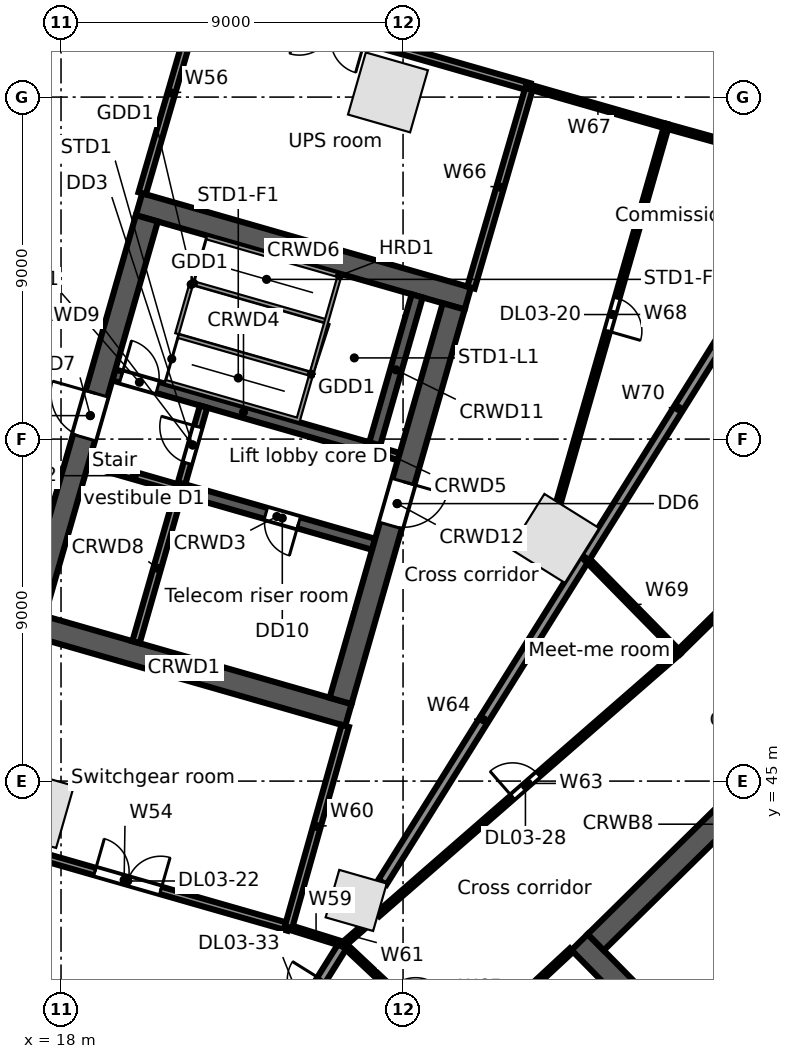
"""IFC4 building model, lengths in metres.
Left out: names, types, materials, properties, quantities, classifications, styles, units other than length and angle.
Written with IfcOpenShell. Run it as: python <this file> out.ifc"""

import sys

from ifc_helpers import new_model, si_unit, direction, frame, frame_2d, origin, origin_2d, place, context, subcontext, project, spatial, rectangle, extrude, element, fill, save


model = new_model("IFC4")
c1 = context("Model", 3, precision=1e-05, world=origin(), true_north=direction((0.0, 1.0)))
c2 = subcontext(c1, "Body", "Model", "MODEL_VIEW")
j1 = project(units=[si_unit("LENGTHUNIT", "METRE"), si_unit("PLANEANGLEUNIT", "RADIAN")], contexts=[c1])
p1 = place(None, origin())
s1 = spatial("IfcSite", under=j1, at=p1, CompositionType="ELEMENT")
p2 = place(p1, origin())
s2 = spatial("IfcBuilding", under=s1, at=p2, CompositionType="ELEMENT")
p3 = place(p2, frame((0.0, 0.0, 21.5)))
s3 = spatial("IfcBuildingStorey", under=s2, at=p3, CompositionType="ELEMENT", Elevation=21.5)
for number, where, z_axis, x_axis in (
    (1, (26.603, 63.124, 0.0), (0.0, 0.0, 1.0), (-0.961, 0.276, 0.0)),
    (2, (17.288, 44.291, 0.0), (0.0, 0.0, 1.0), (0.961, -0.276, 0.0)),
):
    element("IfcColumn", number, at=place(p3, frame(where, z_axis=z_axis, x_axis=x_axis)), inside=s3, PredefinedType="COLUMN", context=c2, shape_type="SweptSolid", body=[
        extrude(rectangle(XDim=1.7, YDim=1.7, at=origin_2d()), origin(), (0.0, 0.0, 1.0), 5.0),
    ])
p4 = place(p3, frame((25.767, 41.86, 0.0), z_axis=(0.0, 0.0, 1.0), x_axis=(0.961261695938, -0.275637355817, 0.0)))
e3 = element("IfcColumn", 3, at=p4, inside=s3, PredefinedType="COLUMN", context=c2, shape_type="SweptSolid", body=[
    extrude(rectangle(XDim=1.3, YDim=1.3, at=origin_2d()), origin(), (0.0, 0.0, 1.0), 5.0),
])
p5 = place(p3, frame((30.99, 51.386, 0.0), z_axis=(0.0, 0.0, 1.0), x_axis=(0.529919264233, 0.848048096156, 0.0)))
e4 = element("IfcColumn", 4, at=p5, inside=s3, PredefinedType="COLUMN", context=c2, shape_type="SweptSolid", body=[
    extrude(rectangle(XDim=1.7, YDim=1.7, at=origin_2d()), origin(), (0.0, 0.0, 1.0), 5.0),
])
p6 = place(p3, frame((31.646, 40.763, 0.0), z_axis=(0.0, 0.0, 1.0), x_axis=(0.700911255944, -0.713248491965, 0.0)))
e5 = element("IfcWall", 5, at=p6, inside=s3, PredefinedType="SOLIDWALL", context=c2, shape_type="SweptSolid", body=[
    extrude(rectangle(XDim=15.0, YDim=0.6, at=frame_2d((7.5, 0.0))), origin(), (0.0, 0.0, 1.0), 4.68),
])
p7 = place(p6, frame((12.9, 0.0, 0.0)))
e6 = element("IfcOpeningElement", 6, at=p7, cuts=e5, PredefinedType="OPENING", context=c2, shape_type="SweptSolid", body=[
    extrude(rectangle(XDim=1.2, YDim=2.1, at=frame_2d((0.6, 1.05))), frame((0.0, 0.31, 0.0), z_axis=(0.0, -1.0, 0.0), x_axis=(1.0, 0.0, 0.0)), (0.0, 0.0, 1.0), 0.62),
])
p8 = place(p3, frame((32.07, 40.759, 0.0), z_axis=(0.0, 0.0, 1.0), x_axis=(0.713245344712, 0.70091445858, 0.0)))
e7 = element("IfcWall", 7, at=p8, inside=s3, PredefinedType="SOLIDWALL", context=c2, shape_type="SweptSolid", body=[
    extrude(rectangle(XDim=13.8, YDim=0.6, at=frame_2d((6.9, 0.0))), origin(), (0.0, 0.0, 1.0), 4.68),
])
p9 = place(p3, frame((34.593, 38.191, 0.0), z_axis=(0.0, 0.0, 1.0), x_axis=(0.713252216116, 0.700907466222, 0.0)))
e8 = element("IfcWall", 8, at=p9, inside=s3, PredefinedType="SOLIDWALL", context=c2, shape_type="SweptSolid", body=[
    extrude(rectangle(XDim=4.45, YDim=0.2, at=frame_2d((2.225, 0.0))), origin(), (0.0, 0.0, 1.0), 4.68),
])
p10 = place(p3, frame((16.911, 49.221, 0.0), z_axis=(0.0, 0.0, 1.0), x_axis=(0.96126248289, -0.275634611374, 0.0)))
e9 = element("IfcWall", 9, at=p10, inside=s3, PredefinedType="SOLIDWALL", context=c2, shape_type="SweptSolid", body=[
    extrude(rectangle(XDim=9.0, YDim=0.6, at=frame_2d((4.5, 0.0))), origin(), (0.0, 0.0, 1.0), 4.68),
])
p11 = place(p3, frame((18.728, 53.382, 0.0), z_axis=(0.0, 0.0, 1.0), x_axis=(0.961247070632, -0.275688355216, 0.0)))
e10 = element("IfcWall", 10, at=p11, inside=s3, PredefinedType="SOLIDWALL", context=c2, shape_type="SweptSolid", body=[
    extrude(rectangle(XDim=2.5, YDim=0.2, at=frame_2d((1.25, 0.0))), origin(), (0.0, 0.0, 1.0), 4.68),
])
p12 = place(p3, frame((21.131, 52.692, 0.0), z_axis=(0.0, 0.0, 1.0), x_axis=(0.961271492568, -0.275603188616, 0.0)))
e11 = element("IfcWall", 11, at=p12, inside=s3, PredefinedType="SOLIDWALL", context=c2, shape_type="SweptSolid", body=[
    extrude(rectangle(XDim=5.3, YDim=0.3, at=frame_2d((2.65, 0.0))), origin(), (0.0, 0.0, 1.0), 4.68),
])
p13 = place(p12, frame((2.35, 0.0, 0.0)))
e12 = element("IfcOpeningElement", 12, at=p13, cuts=e11, PredefinedType="OPENING", context=c2, shape_type="SweptSolid", body=[
    extrude(rectangle(XDim=0.9, YDim=2.1, at=frame_2d((0.45, 1.05))), frame((0.0, 0.16, 0.0), z_axis=(0.0, -1.0, 0.0), x_axis=(1.0, 0.0, 0.0)), (0.0, 0.0, 1.0), 0.32),
])
p14 = place(p3, frame((19.389, 55.689, 0.0), z_axis=(0.0, 0.0, 1.0), x_axis=(0.961261397636, -0.275638396117, 0.0)))
e13 = element("IfcWall", 13, at=p14, inside=s3, PredefinedType="SOLIDWALL", context=c2, shape_type="SweptSolid", body=[
    extrude(rectangle(XDim=7.1, YDim=0.3, at=frame_2d((3.55, 0.0))), origin(), (0.0, 0.0, 1.0), 4.68),
])
p15 = place(p14, frame((0.2, 0.0, 0.0)))
e14 = element("IfcOpeningElement", 14, at=p15, cuts=e13, PredefinedType="OPENING", context=c2, shape_type="SweptSolid", body=[
    extrude(rectangle(XDim=1.0, YDim=2.1, at=frame_2d((0.5, 1.05))), frame((0.0, 0.16, 0.0), z_axis=(0.0, -1.0, 0.0), x_axis=(1.0, 0.0, 0.0)), (0.0, 0.0, 1.0), 0.32),
])
p16 = place(p3, frame((26.214, 53.732, 0.0), z_axis=(0.0, 0.0, 1.0), x_axis=(0.96122076476, -0.27578005982, 0.0)))
e15 = element("IfcWall", 15, at=p16, inside=s3, PredefinedType="SOLIDWALL", context=c2, shape_type="SweptSolid", body=[
    extrude(rectangle(XDim=0.7, YDim=0.2, at=frame_2d((0.35, 0.0))), origin(), (0.0, 0.0, 1.0), 4.68),
])
p17 = place(p3, frame((20.053, 60.18, 0.0), z_axis=(0.0, 0.0, 1.0), x_axis=(0.96126248289, -0.275634611374, 0.0)))
e16 = element("IfcWall", 16, at=p17, inside=s3, PredefinedType="SOLIDWALL", context=c2, shape_type="SweptSolid", body=[
    extrude(rectangle(XDim=9.0, YDim=0.6, at=frame_2d((4.5, 0.0))), origin(), (0.0, 0.0, 1.0), 4.68),
])
p18 = place(p3, frame((17.282, 49.427, 0.0), z_axis=(0.0, 0.0, 1.0), x_axis=(0.275631631629, 0.961263337304, 0.0)))
e17 = element("IfcWall", 17, at=p18, inside=s3, PredefinedType="SOLIDWALL", context=c2, shape_type="SweptSolid", body=[
    extrude(rectangle(XDim=10.8, YDim=0.6, at=frame_2d((5.4, 0.0))), origin(), (0.0, 0.0, 1.0), 4.68),
])
p19 = place(p18, frame((4.8, 0.0, 0.0)))
e18 = element("IfcOpeningElement", 18, at=p19, cuts=e17, PredefinedType="OPENING", context=c2, shape_type="SweptSolid", body=[
    extrude(rectangle(XDim=1.2, YDim=2.1, at=frame_2d((0.6, 1.05))), frame((0.0, 0.31, 0.0), z_axis=(0.0, -1.0, 0.0), x_axis=(1.0, 0.0, 0.0)), (0.0, 0.0, 1.0), 0.62),
])
p20 = place(p3, frame((19.973, 48.655, 0.0), z_axis=(0.0, 0.0, 1.0), x_axis=(0.275668441653, 0.961252781674, 0.0)))
e19 = element("IfcWall", 19, at=p20, inside=s3, PredefinedType="SOLIDWALL", context=c2, shape_type="SweptSolid", body=[
    extrude(rectangle(XDim=4.05, YDim=0.2, at=frame_2d((2.025, 0.0))), origin(), (0.0, 0.0, 1.0), 4.68),
])
p21 = place(p3, frame((21.172, 52.837, 0.0), z_axis=(0.0, 0.0, 1.0), x_axis=(0.275657676022, 0.961255868981, 0.0)))
e20 = element("IfcWall", 20, at=p21, inside=s3, PredefinedType="PARTITIONING", context=c2, shape_type="SweptSolid", body=[
    extrude(rectangle(XDim=2.1, YDim=0.2, at=frame_2d((1.05, 0.0))), origin(), (0.0, 0.0, 1.0), 4.68),
])
p22 = place(p21, frame((0.55, 0.0, 0.0)))
e21 = element("IfcOpeningElement", 21, at=p22, cuts=e20, PredefinedType="OPENING", context=c2, shape_type="SweptSolid", body=[
    extrude(rectangle(XDim=1.0, YDim=2.1, at=frame_2d((0.5, 1.05))), frame((0.0, 0.11, 0.0), z_axis=(0.0, -1.0, 0.0), x_axis=(1.0, 0.0, 0.0)), (0.0, 0.0, 1.0), 0.22),
])
p23 = place(p3, frame((26.256, 53.876, 0.0), z_axis=(0.0, 0.0, 1.0), x_axis=(0.275612739511, 0.961268754209, 0.0)))
e22 = element("IfcWall", 22, at=p23, inside=s3, PredefinedType="SOLIDWALL", context=c2, shape_type="SweptSolid", body=[
    extrude(rectangle(XDim=4.05, YDim=0.3, at=frame_2d((2.025, 0.0))), origin(), (0.0, 0.0, 1.0), 4.68),
])
p24 = place(p3, frame((25.356, 47.112, 0.0), z_axis=(0.0, 0.0, 1.0), x_axis=(0.275631631629, 0.961263337304, 0.0)))
e23 = element("IfcWall", 23, at=p24, inside=s3, PredefinedType="SOLIDWALL", context=c2, shape_type="SweptSolid", body=[
    extrude(rectangle(XDim=10.8, YDim=0.6, at=frame_2d((5.4, 0.0))), origin(), (0.0, 0.0, 1.0), 4.68),
])
p25 = place(p24, frame((4.8, 0.0, 0.0)))
e24 = element("IfcOpeningElement", 24, at=p25, cuts=e23, PredefinedType="OPENING", context=c2, shape_type="SweptSolid", body=[
    extrude(rectangle(XDim=1.2, YDim=2.1, at=frame_2d((0.6, 1.05))), frame((0.0, 0.31, 0.0), z_axis=(0.0, -1.0, 0.0), x_axis=(1.0, 0.0, 0.0)), (0.0, 0.0, 1.0), 0.62),
])
p26 = place(p3, frame((11.73, 44.673, 0.0), z_axis=(0.0, 0.0, 1.0), x_axis=(0.275616869382, 0.961267570093, 0.0)))
e25 = element("IfcWall", 25, at=p26, inside=s3, PredefinedType="PARTITIONING", context=c2, shape_type="SweptSolid", body=[
    extrude(rectangle(XDim=23.0, YDim=0.125, at=frame_2d((11.5, 0.0))), origin(), (0.0, 0.0, 1.0), 3.742),
])
p27 = place(p26, frame((10.95, 0.0, 0.0)))
e26 = element("IfcOpeningElement", 26, at=p27, cuts=e25, PredefinedType="OPENING", context=c2, shape_type="SweptSolid", body=[
    extrude(rectangle(XDim=0.9, YDim=2.1, at=frame_2d((0.45, 1.05))), frame((0.0, 0.073, 0.0), z_axis=(0.0, -1.0, 0.0), x_axis=(1.0, 0.0, 0.0)), (0.0, 0.0, 1.0), 0.145),
])
p28 = place(p3, frame((15.335, 43.639, 0.0), z_axis=(0.0, 0.0, 1.0), x_axis=(0.961281982754, -0.275566597455, 0.0)))
e27 = element("IfcWall", 27, at=p28, inside=s3, PredefinedType="PARTITIONING", context=c2, shape_type="SweptSolid", body=[
    extrude(rectangle(XDim=9.0, YDim=0.2, at=frame_2d((4.5, 0.0))), origin(), (0.0, 0.0, 1.0), 3.748),
])
p29 = place(p28, frame((3.7, 0.0, 0.0)))
e28 = element("IfcOpeningElement", 28, at=p29, cuts=e27, PredefinedType="OPENING", context=c2, shape_type="SweptSolid", body=[
    extrude(rectangle(XDim=1.8, YDim=2.1, at=frame_2d((0.9, 1.05))), frame((0.0, 0.11, 0.0), z_axis=(0.0, -1.0, 0.0), x_axis=(1.0, 0.0, 0.0)), (0.0, 0.0, 1.0), 0.22),
])
p30 = place(p3, frame((20.136, 60.468, 0.0), z_axis=(0.0, 0.0, 1.0), x_axis=(0.279630121779, 0.96010780384, 0.0)))
e29 = element("IfcWall", 29, at=p30, inside=s3, PredefinedType="PARTITIONING", context=c2, shape_type="SweptSolid", body=[
    extrude(rectangle(XDim=5.5, YDim=0.2, at=frame_2d((2.75, 0.0))), origin(), (0.0, 0.0, 1.0), 3.96),
])
p31 = place(p3, frame((21.674, 65.749, 0.0), z_axis=(0.0, 0.0, 1.0), x_axis=(0.961259417468, -0.275645301662, 0.0)))
e30 = element("IfcWall", 30, at=p31, inside=s3, PredefinedType="PARTITIONING", context=c2, shape_type="SweptSolid", body=[
    extrude(rectangle(XDim=9.0, YDim=0.2, at=frame_2d((4.5, 0.0))), origin(), (0.0, 0.0, 1.0), 3.748),
])
p32 = place(p31, frame((2.7, 0.0, 0.0)))
e31 = element("IfcOpeningElement", 31, at=p32, cuts=e30, PredefinedType="OPENING", context=c2, shape_type="SweptSolid", body=[
    extrude(rectangle(XDim=1.8, YDim=2.1, at=frame_2d((0.9, 1.05))), frame((0.0, 0.11, 0.0), z_axis=(0.0, -1.0, 0.0), x_axis=(1.0, 0.0, 0.0)), (0.0, 0.0, 1.0), 0.22),
])
p33 = place(p3, frame((23.397, 37.442, 0.0), z_axis=(0.0, 0.0, 1.0), x_axis=(0.529805058875, 0.848119448893, 0.0)))
e32 = element("IfcWall", 32, at=p33, inside=s3, PredefinedType="PARTITIONING", context=c2, shape_type="SweptSolid", body=[
    extrude(rectangle(XDim=3.849, YDim=0.25, at=frame_2d((1.924, 0.0))), origin(), (0.0, 0.0, 1.0), 3.742),
])
p34 = place(p33, frame((0.95, 0.0, 0.0)))
e33 = element("IfcOpeningElement", 33, at=p34, cuts=e32, PredefinedType="OPENING", context=c2, shape_type="SweptSolid", body=[
    extrude(rectangle(XDim=1.8, YDim=2.1, at=frame_2d((0.9, 1.05))), frame((0.0, 0.135, 0.0), z_axis=(0.0, -1.0, 0.0), x_axis=(1.0, 0.0, 0.0)), (0.0, 0.0, 1.0), 0.27),
])
p35 = place(p3, frame((23.986, 41.159, 0.0), z_axis=(0.0, 0.0, 1.0), x_axis=(0.954522865266, -0.298137719325, 0.0)))
e34 = element("IfcWall", 34, at=p35, inside=s3, PredefinedType="PARTITIONING", context=c2, shape_type="SweptSolid", body=[
    extrude(rectangle(XDim=1.519, YDim=0.125, at=frame_2d((0.76, 0.0))), origin(), (0.0, 0.0, 1.0), 3.742),
])
p36 = place(p3, frame((23.986, 41.159, 0.0), z_axis=(0.0, 0.0, 1.0), x_axis=(0.271465437068, 0.962448188983, 0.0)))
e35 = element("IfcWall", 35, at=p36, inside=s3, PredefinedType="PARTITIONING", context=c2, shape_type="SweptSolid", body=[
    extrude(rectangle(XDim=5.5, YDim=0.2, at=frame_2d((2.75, 0.0))), origin(), (0.0, 0.0, 1.0), 3.96),
])
p37 = place(p3, frame((25.436, 40.706, 0.0), z_axis=(0.0, 0.0, 1.0), x_axis=(0.753521944961, 0.657422754749, 0.0)))
e36 = element("IfcWall", 36, at=p37, inside=s3, PredefinedType="PARTITIONING", context=c2, shape_type="SweptSolid", body=[
    extrude(rectangle(XDim=0.656, YDim=0.125, at=frame_2d((0.328, 0.0))), origin(), (0.0, 0.0, 1.0), 4.68),
])
p38 = place(p3, frame((25.436, 40.706, 0.0), z_axis=(0.0, 0.0, 1.0), x_axis=(0.729011488135, -0.684501461041, 0.0)))
e37 = element("IfcWall", 37, at=p38, inside=s3, PredefinedType="PARTITIONING", context=c2, shape_type="SweptSolid", body=[
    extrude(rectangle(XDim=4.202, YDim=0.125, at=frame_2d((2.101, 0.0))), origin(), (0.0, 0.0, 1.0), 4.68),
])
p39 = place(p38, frame((1.7, 0.0, 0.0)))
e38 = element("IfcOpeningElement", 38, at=p39, cuts=e37, PredefinedType="OPENING", context=c2, shape_type="SweptSolid", body=[
    extrude(rectangle(XDim=0.9, YDim=2.1, at=frame_2d((0.45, 1.05))), frame((0.0, 0.073, 0.0), z_axis=(0.0, -1.0, 0.0), x_axis=(1.0, 0.0, 0.0)), (0.0, 0.0, 1.0), 0.145),
])
p40 = place(p3, frame((26.338, 41.492, 0.0), z_axis=(0.0, 0.0, 1.0), x_axis=(0.753866696092, 0.657027400131, 0.0)))
e39 = element("IfcWall", 39, at=p40, inside=s3, PredefinedType="PARTITIONING", context=c2, shape_type="SweptSolid", body=[
    extrude(rectangle(XDim=10.493, YDim=0.125, at=frame_2d((5.246, 0.0))), origin(), (0.0, 0.0, 1.0), 3.742),
])
p41 = place(p40, frame((4.7, 0.0, 0.0)))
e40 = element("IfcOpeningElement", 40, at=p41, cuts=e39, PredefinedType="OPENING", context=c2, shape_type="SweptSolid", body=[
    extrude(rectangle(XDim=0.9, YDim=2.1, at=frame_2d((0.45, 1.05))), frame((0.0, 0.073, 0.0), z_axis=(0.0, -1.0, 0.0), x_axis=(1.0, 0.0, 0.0)), (0.0, 0.0, 1.0), 0.145),
])
p42 = place(p3, frame((26.456, 42.338, 0.0), z_axis=(0.0, 0.0, 1.0), x_axis=(0.529866075757, 0.848081329686, 0.0)))
e41 = element("IfcWall", 41, at=p42, inside=s3, PredefinedType="PARTITIONING", context=c2, shape_type="SweptSolid", body=[
    extrude(rectangle(XDim=10.076, YDim=0.25, at=frame_2d((5.038, 0.0))), origin(), (0.0, 0.0, 1.0), 3.742),
])
p43 = place(p3, frame((28.499, 37.83, 0.0), z_axis=(0.0, 0.0, 1.0), x_axis=(0.732973836409, 0.680256830278, 0.0)))
e42 = element("IfcWall", 42, at=p43, inside=s3, PredefinedType="PARTITIONING", context=c2, shape_type="SweptSolid", body=[
    extrude(rectangle(XDim=4.001, YDim=0.125, at=frame_2d((2.0, 0.0))), origin(), (0.0, 0.0, 1.0), 3.952),
])
p44 = place(p3, frame((28.787, 57.987, 0.0), z_axis=(0.0, 0.0, 1.0), x_axis=(0.279752860161, 0.960072047938, 0.0)))
e43 = element("IfcWall", 43, at=p44, inside=s3, PredefinedType="PARTITIONING", context=c2, shape_type="SweptSolid", body=[
    extrude(rectangle(XDim=5.501, YDim=0.2, at=frame_2d((2.75, 0.0))), origin(), (0.0, 0.0, 1.0), 3.852),
])
p45 = place(p3, frame((30.326, 63.268, 0.0), z_axis=(0.0, 0.0, 1.0), x_axis=(0.96120880595, -0.275821738383, 0.0)))
e44 = element("IfcWall", 44, at=p45, inside=s3, PredefinedType="PARTITIONING", context=c2, shape_type="SweptSolid", body=[
    extrude(rectangle(XDim=3.75, YDim=0.125, at=frame_2d((1.875, 0.0))), origin(), (0.0, 0.0, 1.0), 4.68),
])
p46 = place(p3, frame((31.089, 52.327, 0.0), z_axis=(0.0, 0.0, 1.0), x_axis=(0.275640835953, 0.961260698019, 0.0)))
e45 = element("IfcWall", 45, at=p46, inside=s3, PredefinedType="PARTITIONING", context=c2, shape_type="SweptSolid", body=[
    extrude(rectangle(XDim=10.306, YDim=0.125, at=frame_2d((5.153, 0.0))), origin(), (0.0, 0.0, 1.0), 3.852),
])
p47 = place(p46, frame((4.7, 0.0, 0.0)))
e46 = element("IfcOpeningElement", 46, at=p47, cuts=e45, PredefinedType="OPENING", context=c2, shape_type="SweptSolid", body=[
    extrude(rectangle(XDim=0.9, YDim=2.1, at=frame_2d((0.45, 1.05))), frame((0.0, 0.073, 0.0), z_axis=(0.0, -1.0, 0.0), x_axis=(1.0, 0.0, 0.0)), (0.0, 0.0, 1.0), 0.145),
])
p48 = place(p3, frame((31.795, 50.883, 0.0), z_axis=(0.0, 0.0, 1.0), x_axis=(0.700801832867, -0.713356005828, 0.0)))
e47 = element("IfcWall", 47, at=p48, inside=s3, PredefinedType="PARTITIONING", context=c2, shape_type="SweptSolid", body=[
    extrude(rectangle(XDim=3.5, YDim=0.125, at=frame_2d((1.75, 0.0))), origin(), (0.0, 0.0, 1.0), 3.742),
])
p49 = place(p3, frame((31.795, 50.883, 0.0), z_axis=(0.0, 0.0, 1.0), x_axis=(0.529939676421, 0.848035340864, 0.0)))
e48 = element("IfcWall", 48, at=p49, inside=s3, PredefinedType="PARTITIONING", context=c2, shape_type="SweptSolid", body=[
    extrude(rectangle(XDim=9.258, YDim=0.25, at=frame_2d((4.629, 0.0))), origin(), (0.0, 0.0, 1.0), 3.742),
])
p50 = place(p3, frame((33.93, 62.234, 0.0), z_axis=(0.0, 0.0, 1.0), x_axis=(0.963433299433, -0.267948274007, 0.0)))
e49 = element("IfcWall", 49, at=p50, inside=s3, PredefinedType="PARTITIONING", context=c2, shape_type="SweptSolid", body=[
    extrude(rectangle(XDim=4.385, YDim=0.125, at=frame_2d((2.192, 0.0))), origin(), (0.0, 0.0, 1.0), 3.96),
])
p51 = place(p3, frame((34.248, 48.386, 0.0), z_axis=(0.0, 0.0, 1.0), x_axis=(0.713246685355, 0.700913094349, 0.0)))
e50 = element("IfcWall", 50, at=p51, inside=s3, PredefinedType="PARTITIONING", context=c2, shape_type="SweptSolid", body=[
    extrude(rectangle(XDim=11.501, YDim=0.125, at=frame_2d((5.75, 0.0))), origin(), (0.0, 0.0, 1.0), 3.76),
])
p52 = place(p51, frame((5.2, 0.0, 0.0)))
e51 = element("IfcOpeningElement", 51, at=p52, cuts=e50, PredefinedType="OPENING", context=c2, shape_type="SweptSolid", body=[
    extrude(rectangle(XDim=0.9, YDim=2.1, at=frame_2d((0.45, 1.05))), frame((0.0, 0.073, 0.0), z_axis=(0.0, -1.0, 0.0), x_axis=(1.0, 0.0, 0.0)), (0.0, 0.0, 1.0), 0.145),
])
p53 = place(p15, origin())
e52 = element("IfcDoor", 52, at=p53, inside=s3, OperationType="SINGLE_SWING_LEFT", PredefinedType="DOOR", context=c2, shape_type="SweptSolid", body=[
    extrude(rectangle(XDim=1.0, YDim=2.1, at=frame_2d((0.5, 1.05))), frame((0.0, 0.025, 0.0), z_axis=(0.0, -1.0, 0.0), x_axis=(1.0, 0.0, 0.0)), (0.0, 0.0, 1.0), 0.05),
])
fill(e14, e52)
p54 = place(p22, origin())
e53 = element("IfcDoor", 53, at=p54, inside=s3, OperationType="SINGLE_SWING_RIGHT", PredefinedType="DOOR", context=c2, shape_type="SweptSolid", body=[
    extrude(rectangle(XDim=1.0, YDim=2.1, at=frame_2d((0.5, 1.05))), frame((0.0, 0.025, 0.0), z_axis=(0.0, -1.0, 0.0), x_axis=(1.0, 0.0, 0.0)), (0.0, 0.0, 1.0), 0.05),
])
fill(e21, e53)
p55 = place(p19, origin())
e54 = element("IfcDoor", 54, at=p55, inside=s3, OperationType="SINGLE_SWING_RIGHT", PredefinedType="DOOR", context=c2, shape_type="SweptSolid", body=[
    extrude(rectangle(XDim=1.2, YDim=2.1, at=frame_2d((0.6, 1.05))), frame((0.0, 0.025, 0.0), z_axis=(0.0, -1.0, 0.0), x_axis=(1.0, 0.0, 0.0)), (0.0, 0.0, 1.0), 0.05),
])
fill(e18, e54)
p56 = place(p25, frame((1.2, 0.0, 0.0), z_axis=(0.0, 0.0, 1.0), x_axis=(-1.0, 0.0, 0.0)))
e55 = element("IfcDoor", 55, at=p56, inside=s3, OperationType="SINGLE_SWING_LEFT", PredefinedType="DOOR", context=c2, shape_type="SweptSolid", body=[
    extrude(rectangle(XDim=1.2, YDim=2.1, at=frame_2d((0.6, 1.05))), frame((0.0, 0.025, 0.0), z_axis=(0.0, -1.0, 0.0), x_axis=(1.0, 0.0, 0.0)), (0.0, 0.0, 1.0), 0.05),
])
fill(e24, e55)
p57 = place(p13, frame((0.9, 0.0, 0.0), z_axis=(0.0, 0.0, 1.0), x_axis=(-1.0, 0.0, 0.0)))
e56 = element("IfcDoor", 56, at=p57, inside=s3, OperationType="SINGLE_SWING_LEFT", PredefinedType="DOOR", context=c2, shape_type="SweptSolid", body=[
    extrude(rectangle(XDim=0.9, YDim=2.1, at=frame_2d((0.45, 1.05))), frame((0.0, 0.025, 0.0), z_axis=(0.0, -1.0, 0.0), x_axis=(1.0, 0.0, 0.0)), (0.0, 0.0, 1.0), 0.05),
])
fill(e12, e56)
p58 = place(p47, frame((0.9, 0.0, 0.0), z_axis=(0.0, 0.0, 1.0), x_axis=(-1.0, 0.0, 0.0)))
e57 = element("IfcDoor", 57, at=p58, inside=s3, OperationType="SINGLE_SWING_RIGHT", PredefinedType="DOOR", context=c2, shape_type="SweptSolid", body=[
    extrude(rectangle(XDim=0.9, YDim=2.1, at=frame_2d((0.45, 1.05))), frame((0.0, 0.025, 0.0), z_axis=(0.0, -1.0, 0.0), x_axis=(1.0, 0.0, 0.0)), (0.0, 0.0, 1.0), 0.05),
])
fill(e46, e57)
p59 = place(p29, origin())
e58 = element("IfcDoor", 58, at=p59, inside=s3, OperationType="DOUBLE_DOOR_SINGLE_SWING", PredefinedType="DOOR", context=c2, shape_type="SweptSolid", body=[
    extrude(rectangle(XDim=1.8, YDim=2.1, at=frame_2d((0.9, 1.05))), frame((0.0, 0.025, 0.0), z_axis=(0.0, -1.0, 0.0), x_axis=(1.0, 0.0, 0.0)), (0.0, 0.0, 1.0), 0.05),
])
fill(e28, e58)
p60 = place(p41, origin())
e59 = element("IfcDoor", 59, at=p60, inside=s3, OperationType="SINGLE_SWING_LEFT", PredefinedType="DOOR", context=c2, shape_type="SweptSolid", body=[
    extrude(rectangle(XDim=0.9, YDim=2.1, at=frame_2d((0.45, 1.05))), frame((0.0, 0.025, 0.0), z_axis=(0.0, -1.0, 0.0), x_axis=(1.0, 0.0, 0.0)), (0.0, 0.0, 1.0), 0.05),
])
fill(e40, e59)
p61 = place(p34, origin())
e60 = element("IfcDoor", 60, at=p61, inside=s3, OperationType="DOUBLE_DOOR_SINGLE_SWING", PredefinedType="DOOR", context=c2, shape_type="SweptSolid", body=[
    extrude(rectangle(XDim=1.8, YDim=2.1, at=frame_2d((0.9, 1.05))), frame((0.0, 0.025, 0.0), z_axis=(0.0, -1.0, 0.0), x_axis=(1.0, 0.0, 0.0)), (0.0, 0.0, 1.0), 0.05),
])
fill(e33, e60)
save(model, sys.argv[1])
